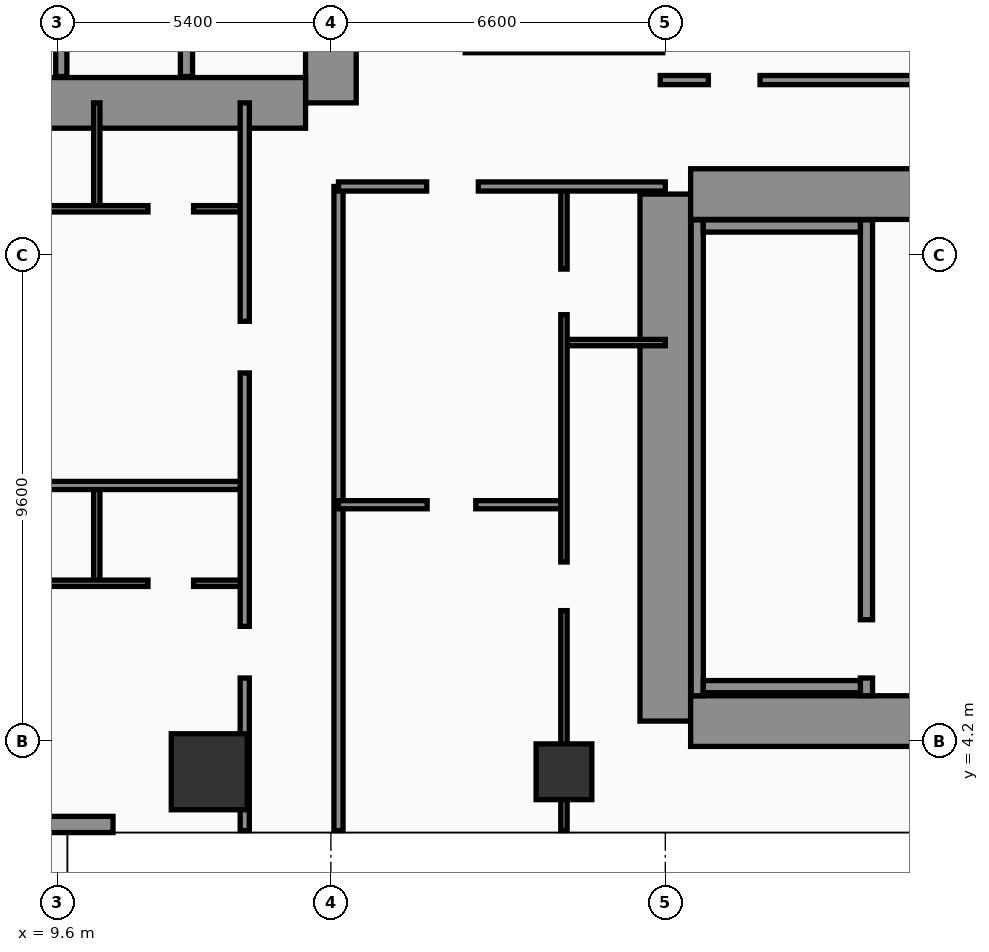
"""IFC4 building model, lengths in metres.
Left out: names, types, materials, properties, quantities, classifications, styles, units other than length and angle.
Written with IfcOpenShell. Run it as: python <this file> out.ifc"""

import sys

from ifc_helpers import new_model, si_unit, direction, frame, frame_2d, origin, origin_2d, place, context, subcontext, project, spatial, rectangle, hollow_rectangle, extrude, element, fill, save


model = new_model("IFC4")
c1 = context("Model", 3, precision=1e-05, world=origin(), true_north=direction((0.0, 1.0)))
c2 = subcontext(c1, "Body", "Model", "MODEL_VIEW")
j1 = project(units=[si_unit("LENGTHUNIT", "METRE"), si_unit("PLANEANGLEUNIT", "RADIAN")], contexts=[c1])
p1 = place(None, origin())
s1 = spatial("IfcSite", under=j1, at=p1, CompositionType="ELEMENT")
p2 = place(p1, origin())
s2 = spatial("IfcBuilding", under=s1, at=p2, CompositionType="ELEMENT")
p3 = place(p2, frame((0.0, 0.0, 66.0)))
s3 = spatial("IfcBuildingStorey", under=s2, at=p3, CompositionType="ELEMENT", Elevation=66.0)
p4 = place(p3, frame((15.0, 16.8, 0.0), z_axis=(0.0, 0.0, 1.0), x_axis=(0.0, 1.0, 0.0)))
e1 = element("IfcWall", 1, at=p4, inside=s3, PredefinedType="SHEAR", context=c2, shape_type="SweptSolid", body=[
    extrude(rectangle(XDim=21.6, YDim=1.0, at=frame_2d((10.8, 0.0))), origin(), (0.0, 0.0, 1.0), 3.56),
])
p5 = place(p4, frame((8.65, 0.0, 0.0)))
e2 = element("IfcOpeningElement", 2, at=p5, cuts=e1, PredefinedType="OPENING", context=c2, shape_type="SweptSolid", body=[
    extrude(rectangle(XDim=1.1, YDim=2.2, at=frame_2d((0.55, 1.1))), frame((0.0, 0.51, 0.0), z_axis=(0.0, -1.0, 0.0), x_axis=(1.0, 0.0, 0.0)), (0.0, 0.0, 1.0), 1.02),
])
p6 = place(p4, frame((1.25, 0.0, 0.0)))
e3 = element("IfcOpeningElement", 3, at=p6, cuts=e1, PredefinedType="OPENING", context=c2, shape_type="SweptSolid", body=[
    extrude(rectangle(XDim=1.1, YDim=2.2, at=frame_2d((0.55, 1.1))), frame((0.0, 0.51, 0.0), z_axis=(0.0, -1.0, 0.0), x_axis=(1.0, 0.0, 0.0)), (0.0, 0.0, 1.0), 1.02),
])
p7 = place(p4, frame((3.8, 0.0, 0.0)))
e4 = element("IfcOpeningElement", 4, at=p7, cuts=e1, PredefinedType="OPENING", context=c2, shape_type="SweptSolid", body=[
    extrude(rectangle(XDim=1.1, YDim=2.2, at=frame_2d((0.55, 1.1))), frame((0.0, 0.51, 0.0), z_axis=(0.0, -1.0, 0.0), x_axis=(1.0, 0.0, 0.0)), (0.0, 0.0, 1.0), 1.02),
])
p8 = place(p4, frame((6.35, 0.0, 0.0)))
e5 = element("IfcOpeningElement", 5, at=p8, cuts=e1, PredefinedType="OPENING", context=c2, shape_type="SweptSolid", body=[
    extrude(rectangle(XDim=1.1, YDim=2.2, at=frame_2d((0.55, 1.1))), frame((0.0, 0.51, 0.0), z_axis=(0.0, -1.0, 0.0), x_axis=(1.0, 0.0, 0.0)), (0.0, 0.0, 1.0), 1.02),
])
p9 = place(p3, frame((4.7, 16.8, 0.0), z_axis=(0.0, 0.0, 1.0), x_axis=(1.0, 0.0, 0.0)))
e6 = element("IfcWall", 6, at=p9, inside=s3, PredefinedType="SHEAR", context=c2, shape_type="SweptSolid", body=[
    extrude(rectangle(XDim=9.8, YDim=1.0, at=frame_2d((4.9, 0.0))), origin(), (0.0, 0.0, 1.0), 3.56),
])
p10 = place(p3, frame((21.6, 4.6, 0.0), z_axis=(0.0, 0.0, 1.0), x_axis=(0.0, 1.0, 0.0)))
e7 = element("IfcWall", 7, at=p10, inside=s3, PredefinedType="SHEAR", context=c2, shape_type="SweptSolid", body=[
    extrude(rectangle(XDim=10.4, YDim=1.0, at=frame_2d((5.2, 0.0))), origin(), (0.0, 0.0, 1.0), 3.56),
])
p11 = place(p3, frame((22.1, 15.0, 0.0), z_axis=(0.0, 0.0, 1.0), x_axis=(1.0, 0.0, 0.0)))
e8 = element("IfcWall", 8, at=p11, inside=s3, PredefinedType="SHEAR", context=c2, shape_type="SweptSolid", body=[
    extrude(rectangle(XDim=9.8, YDim=1.0, at=frame_2d((4.9, 0.0))), origin(), (0.0, 0.0, 1.0), 3.56),
])
p12 = place(p11, frame((4.8, 0.0, 0.0)))
e9 = element("IfcOpeningElement", 9, at=p12, cuts=e8, PredefinedType="OPENING", context=c2, shape_type="SweptSolid", body=[
    extrude(rectangle(XDim=1.1, YDim=2.2, at=frame_2d((0.55, 1.1))), frame((0.0, 0.51, 0.0), z_axis=(0.0, -1.0, 0.0), x_axis=(1.0, 0.0, 0.0)), (0.0, 0.0, 1.0), 1.02),
])
p13 = place(p3, frame((22.1, 4.6, 0.0), z_axis=(0.0, 0.0, 1.0), x_axis=(1.0, 0.0, 0.0)))
e10 = element("IfcWall", 10, at=p13, inside=s3, PredefinedType="SHEAR", context=c2, shape_type="SweptSolid", body=[
    extrude(rectangle(XDim=9.8, YDim=1.0, at=frame_2d((4.9, 0.0))), origin(), (0.0, 0.0, 1.0), 3.56),
])
p14 = place(p3, frame((22.23, 5.1, 0.0), z_axis=(0.0, 0.0, 1.0), x_axis=(0.0, 1.0, 0.0)))
e11 = element("IfcWall", 11, at=p14, inside=s3, PredefinedType="SOLIDWALL", context=c2, shape_type="SweptSolid", body=[
    extrude(rectangle(XDim=9.39, YDim=0.24, at=frame_2d((4.695, 0.0))), origin(), (0.0, 0.0, 1.0), 3.56),
])
p15 = place(p3, frame((25.57, 5.1, 0.0), z_axis=(0.0, 0.0, 1.0), x_axis=(0.0, 1.0, 0.0)))
e12 = element("IfcWall", 12, at=p15, inside=s3, PredefinedType="SOLIDWALL", context=c2, shape_type="SweptSolid", body=[
    extrude(rectangle(XDim=9.39, YDim=0.24, at=frame_2d((4.695, 0.0))), origin(), (0.0, 0.0, 1.0), 3.56),
])
p16 = place(p15, frame((0.35, 0.0, 0.0)))
e13 = element("IfcOpeningElement", 13, at=p16, cuts=e12, PredefinedType="OPENING", context=c2, shape_type="SweptSolid", body=[
    extrude(rectangle(XDim=1.15, YDim=2.2, at=frame_2d((0.575, 1.1))), frame((0.0, 0.13, 0.0), z_axis=(0.0, -1.0, 0.0), x_axis=(1.0, 0.0, 0.0)), (0.0, 0.0, 1.0), 0.26),
])
for number, where, z_axis, x_axis in (
    (14, (22.35, 5.28, 0.0), (0.0, 0.0, 1.0), (1.0, 0.0, 0.0)),
    (15, (22.35, 14.37, 0.0), (0.0, 0.0, 1.0), (1.0, 0.0, 0.0)),
):
    element("IfcWall", number, at=place(p3, frame(where, z_axis=z_axis, x_axis=x_axis)), inside=s3, PredefinedType="SOLIDWALL", context=c2, shape_type="SweptSolid", body=[
        extrude(rectangle(XDim=3.1, YDim=0.24, at=frame_2d((1.55, 0.0))), origin(), (0.0, 0.0, 1.0), 3.56),
    ])
p17 = place(p3, frame((12.6, 3.6, 0.0), z_axis=(0.0, 0.0, 1.0), x_axis=(1.0, 0.0, 0.0)))
e16 = element("IfcColumn", 16, at=p17, inside=s3, PredefinedType="COLUMN", context=c2, shape_type="SweptSolid", body=[
    extrude(rectangle(XDim=1.5, YDim=1.5, at=origin_2d()), origin(), (0.0, 0.0, 1.0), 3.56),
])
p18 = place(p3, frame((19.6, 3.6, 0.0), z_axis=(0.0, 0.0, 1.0), x_axis=(1.0, 0.0, 0.0)))
e17 = element("IfcColumn", 17, at=p18, inside=s3, PredefinedType="COLUMN", context=c2, shape_type="SweptSolid", body=[
    extrude(hollow_rectangle(XDim=1.1, YDim=1.1, WallThickness=0.045, at=origin_2d()), origin(), (0.0, 0.0, 1.0), 3.56),
])
p19 = place(p3, frame((3.1, 2.56, 0.0), z_axis=(0.0, 0.0, 1.0), x_axis=(1.0, 0.0, 0.0)))
e18 = element("IfcWall", 18, at=p19, inside=s3, PredefinedType="SOLIDWALL", context=c2, shape_type="SweptSolid", body=[
    extrude(rectangle(XDim=7.6, YDim=0.32, at=frame_2d((3.8, 0.0))), origin(), (0.0, 0.0, 1.0), 3.56),
])
p20 = place(p19, frame((0.45, 0.0, 0.75)))
e19 = element("IfcOpeningElement", 19, at=p20, cuts=e18, PredefinedType="OPENING", context=c2, shape_type="SweptSolid", body=[
    extrude(rectangle(XDim=1.0, YDim=1.6, at=frame_2d((0.5, 0.8))), frame((0.0, 0.17, 0.0), z_axis=(0.0, -1.0, 0.0), x_axis=(1.0, 0.0, 0.0)), (0.0, 0.0, 1.0), 0.34),
])
p21 = place(p19, frame((3.8, 0.0, 0.0)))
e20 = element("IfcOpeningElement", 20, at=p21, cuts=e18, PredefinedType="OPENING", context=c2, shape_type="SweptSolid", body=[
    extrude(rectangle(XDim=1.4, YDim=2.25, at=frame_2d((0.7, 1.125))), frame((0.0, 0.17, 0.0), z_axis=(0.0, -1.0, 0.0), x_axis=(1.0, 0.0, 0.0)), (0.0, 0.0, 1.0), 0.34),
])
p22 = place(p3, frame((9.68, 17.32, 0.0), z_axis=(0.0, 0.0, 1.0), x_axis=(0.0, 1.0, 0.0)))
e21 = element("IfcWall", 21, at=p22, inside=s3, PredefinedType="SOLIDWALL", context=c2, shape_type="SweptSolid", body=[
    extrude(rectangle(XDim=7.68, YDim=0.22, at=frame_2d((3.84, 0.0))), origin(), (0.0, 0.0, 1.0), 3.56),
])
p23 = place(p3, frame((12.15, 17.32, 0.0), z_axis=(0.0, 0.0, 1.0), x_axis=(0.0, 1.0, 0.0)))
e22 = element("IfcWall", 22, at=p23, inside=s3, PredefinedType="SOLIDWALL", context=c2, shape_type="SweptSolid", body=[
    extrude(rectangle(XDim=7.65, YDim=0.24, at=frame_2d((3.825, 0.0))), origin(), (0.0, 0.0, 1.0), 3.56),
])
p24 = place(p3, frame((10.38, 7.32, 0.0), z_axis=(0.0, 0.0, 1.0), x_axis=(0.0, 1.0, 0.0)))
e23 = element("IfcWall", 23, at=p24, inside=s3, PredefinedType="PARTITIONING", context=c2, shape_type="SweptSolid", body=[
    extrude(rectangle(XDim=1.93, YDim=0.125, at=frame_2d((0.965, 0.0))), origin(), (0.0, 0.0, 1.0), 3.56),
])
p25 = place(p3, frame((3.2, 7.32, 0.0), z_axis=(0.0, 0.0, 1.0), x_axis=(1.0, 0.0, 0.0)))
e24 = element("IfcWall", 24, at=p25, inside=s3, PredefinedType="PARTITIONING", context=c2, shape_type="SweptSolid", body=[
    extrude(rectangle(XDim=10.1, YDim=0.125, at=frame_2d((5.05, 0.0))), origin(), (0.0, 0.0, 1.0), 2.84),
])
p26 = place(p25, frame((3.29, 0.0, 0.0)))
e25 = element("IfcOpeningElement", 25, at=p26, cuts=e24, PredefinedType="OPENING", context=c2, shape_type="SweptSolid", body=[
    extrude(rectangle(XDim=0.96, YDim=2.2, at=frame_2d((0.48, 1.1))), frame((0.0, 0.073, 0.0), z_axis=(0.0, -1.0, 0.0), x_axis=(1.0, 0.0, 0.0)), (0.0, 0.0, 1.0), 0.145),
])
p27 = place(p25, frame((8.19, 0.0, 0.0)))
e26 = element("IfcOpeningElement", 26, at=p27, cuts=e24, PredefinedType="OPENING", context=c2, shape_type="SweptSolid", body=[
    extrude(rectangle(XDim=0.9, YDim=2.15, at=frame_2d((0.45, 1.075))), frame((0.0, 0.073, 0.0), z_axis=(0.0, -1.0, 0.0), x_axis=(1.0, 0.0, 0.0)), (0.0, 0.0, 1.0), 0.145),
])
p28 = place(p3, frame((10.38, 14.71, 0.0), z_axis=(0.0, 0.0, 1.0), x_axis=(0.0, 1.0, 0.0)))
e27 = element("IfcWall", 27, at=p28, inside=s3, PredefinedType="PARTITIONING", context=c2, shape_type="SweptSolid", body=[
    extrude(rectangle(XDim=2.09, YDim=0.125, at=frame_2d((1.045, 0.0))), origin(), (0.0, 0.0, 1.0), 3.56),
])
p29 = place(p3, frame((0.08, 14.71, 0.0), z_axis=(0.0, 0.0, 1.0), x_axis=(1.0, 0.0, 0.0)))
e28 = element("IfcWall", 28, at=p29, inside=s3, PredefinedType="PARTITIONING", context=c2, shape_type="SweptSolid", body=[
    extrude(rectangle(XDim=13.22, YDim=0.125, at=frame_2d((6.61, 0.0))), origin(), (0.0, 0.0, 1.0), 2.84),
])
p30 = place(p29, frame((4.67, 0.0, 0.0)))
e29 = element("IfcOpeningElement", 29, at=p30, cuts=e28, PredefinedType="OPENING", context=c2, shape_type="SweptSolid", body=[
    extrude(rectangle(XDim=0.96, YDim=2.2, at=frame_2d((0.48, 1.1))), frame((0.0, 0.073, 0.0), z_axis=(0.0, -1.0, 0.0), x_axis=(1.0, 0.0, 0.0)), (0.0, 0.0, 1.0), 0.145),
])
p31 = place(p29, frame((11.31, 0.0, 0.0)))
e30 = element("IfcOpeningElement", 30, at=p31, cuts=e28, PredefinedType="OPENING", context=c2, shape_type="SweptSolid", body=[
    extrude(rectangle(XDim=0.9, YDim=2.15, at=frame_2d((0.45, 1.075))), frame((0.0, 0.073, 0.0), z_axis=(0.0, -1.0, 0.0), x_axis=(1.0, 0.0, 0.0)), (0.0, 0.0, 1.0), 0.145),
])
p32 = place(p3, frame((0.08, 9.25, 0.0), z_axis=(0.0, 0.0, 1.0), x_axis=(1.0, 0.0, 0.0)))
e31 = element("IfcWall", 31, at=p32, inside=s3, PredefinedType="PARTITIONING", context=c2, shape_type="SweptSolid", body=[
    extrude(rectangle(XDim=13.22, YDim=0.16, at=frame_2d((6.61, 0.0))), origin(), (0.0, 0.0, 1.0), 2.84),
])
p33 = place(p3, frame((13.3, 2.44, 0.0), z_axis=(0.0, 0.0, 1.0), x_axis=(0.0, 1.0, 0.0)))
e32 = element("IfcWall", 32, at=p33, inside=s3, PredefinedType="PARTITIONING", context=c2, shape_type="SweptSolid", body=[
    extrude(rectangle(XDim=14.36, YDim=0.18, at=frame_2d((7.18, 0.0))), origin(), (0.0, 0.0, 1.0), 3.04),
])
p34 = place(p33, frame((3.01, 0.0, 0.0)))
e33 = element("IfcOpeningElement", 33, at=p34, cuts=e32, PredefinedType="OPENING", context=c2, shape_type="SweptSolid", body=[
    extrude(rectangle(XDim=1.02, YDim=2.2, at=frame_2d((0.51, 1.1))), frame((0.0, 0.1, 0.0), z_axis=(0.0, -1.0, 0.0), x_axis=(1.0, 0.0, 0.0)), (0.0, 0.0, 1.0), 0.2),
])
p35 = place(p33, frame((9.03, 0.0, 0.0)))
e34 = element("IfcOpeningElement", 34, at=p35, cuts=e32, PredefinedType="OPENING", context=c2, shape_type="SweptSolid", body=[
    extrude(rectangle(XDim=1.02, YDim=2.2, at=frame_2d((0.51, 1.1))), frame((0.0, 0.1, 0.0), z_axis=(0.0, -1.0, 0.0), x_axis=(1.0, 0.0, 0.0)), (0.0, 0.0, 1.0), 0.2),
])
p36 = place(p3, frame((15.15, 2.44, 0.0), z_axis=(0.0, 0.0, 1.0), x_axis=(0.0, 1.0, 0.0)))
e35 = element("IfcWall", 35, at=p36, inside=s3, PredefinedType="PARTITIONING", context=c2, shape_type="SweptSolid", body=[
    extrude(rectangle(XDim=12.71, YDim=0.18, at=frame_2d((6.355, 0.0))), origin(), (0.0, 0.0, 1.0), 3.04),
])
p37 = place(p3, frame((19.6, 12.07, 0.0), z_axis=(0.0, 0.0, 1.0), x_axis=(1.0, 0.0, 0.0)))
e36 = element("IfcWall", 36, at=p37, inside=s3, PredefinedType="PARTITIONING", context=c2, shape_type="SweptSolid", body=[
    extrude(rectangle(XDim=2.0, YDim=0.125, at=frame_2d((1.0, 0.0))), origin(), (0.0, 0.0, 1.0), 3.56),
])
p38 = place(p3, frame((15.15, 8.87, 0.0), z_axis=(0.0, 0.0, 1.0), x_axis=(1.0, 0.0, 0.0)))
e37 = element("IfcWall", 37, at=p38, inside=s3, PredefinedType="PARTITIONING", context=c2, shape_type="SweptSolid", body=[
    extrude(rectangle(XDim=4.45, YDim=0.16, at=frame_2d((2.225, 0.0))), origin(), (0.0, 0.0, 1.0), 3.56),
])
p39 = place(p38, frame((1.75, 0.0, 0.0)))
e38 = element("IfcOpeningElement", 38, at=p39, cuts=e37, PredefinedType="OPENING", context=c2, shape_type="SweptSolid", body=[
    extrude(rectangle(XDim=0.96, YDim=2.2, at=frame_2d((0.48, 1.1))), frame((0.0, 0.09, 0.0), z_axis=(0.0, -1.0, 0.0), x_axis=(1.0, 0.0, 0.0)), (0.0, 0.0, 1.0), 0.18),
])
p40 = place(p3, frame((19.6, 2.44, 0.0), z_axis=(0.0, 0.0, 1.0), x_axis=(0.0, 1.0, 0.0)))
e39 = element("IfcWall", 39, at=p40, inside=s3, PredefinedType="PARTITIONING", context=c2, shape_type="SweptSolid", body=[
    extrude(rectangle(XDim=12.71, YDim=0.125, at=frame_2d((6.355, 0.0))), origin(), (0.0, 0.0, 1.0), 2.34),
])
p41 = place(p40, frame((4.34, 0.0, 0.0)))
e40 = element("IfcOpeningElement", 40, at=p41, cuts=e39, PredefinedType="OPENING", context=c2, shape_type="SweptSolid", body=[
    extrude(rectangle(XDim=0.96, YDim=2.2, at=frame_2d((0.48, 1.1))), frame((0.0, 0.073, 0.0), z_axis=(0.0, -1.0, 0.0), x_axis=(1.0, 0.0, 0.0)), (0.0, 0.0, 1.0), 0.145),
])
p42 = place(p40, frame((10.18, 0.0, 0.0)))
e41 = element("IfcOpeningElement", 41, at=p42, cuts=e39, PredefinedType="OPENING", context=c2, shape_type="SweptSolid", body=[
    extrude(rectangle(XDim=0.9, YDim=2.15, at=frame_2d((0.45, 1.075))), frame((0.0, 0.073, 0.0), z_axis=(0.0, -1.0, 0.0), x_axis=(1.0, 0.0, 0.0)), (0.0, 0.0, 1.0), 0.145),
])
p43 = place(p3, frame((15.15, 15.15, 0.0), z_axis=(0.0, 0.0, 1.0), x_axis=(1.0, 0.0, 0.0)))
e42 = element("IfcWall", 42, at=p43, inside=s3, PredefinedType="PARTITIONING", context=c2, shape_type="SweptSolid", body=[
    extrude(rectangle(XDim=6.45, YDim=0.18, at=frame_2d((3.225, 0.0))), origin(), (0.0, 0.0, 1.0), 2.34),
])
p44 = place(p43, frame((1.74, 0.0, 0.0)))
e43 = element("IfcOpeningElement", 43, at=p44, cuts=e42, PredefinedType="OPENING", context=c2, shape_type="SweptSolid", body=[
    extrude(rectangle(XDim=1.02, YDim=2.2, at=frame_2d((0.51, 1.1))), frame((0.0, 0.1, 0.0), z_axis=(0.0, -1.0, 0.0), x_axis=(1.0, 0.0, 0.0)), (0.0, 0.0, 1.0), 0.2),
])
p45 = place(p3, frame((17.65, 17.88, 0.0), z_axis=(0.0, 0.0, 1.0), x_axis=(1.0, 0.0, 0.0)))
e44 = element("IfcWall", 44, at=p45, inside=s3, PredefinedType="PARTITIONING", context=c2, shape_type="SweptSolid", body=[
    extrude(rectangle(XDim=3.9, YDim=0.18, at=frame_2d((1.95, 0.0))), origin(), (0.0, 0.0, 1.0), 3.56),
])
p46 = place(p3, frame((21.5, 17.25, 0.0), z_axis=(0.0, 0.0, 1.0), x_axis=(1.0, 0.0, 0.0)))
e45 = element("IfcWall", 45, at=p46, inside=s3, PredefinedType="PARTITIONING", context=c2, shape_type="SweptSolid", body=[
    extrude(rectangle(XDim=27.45, YDim=0.18, at=frame_2d((13.725, 0.0))), origin(), (0.0, 0.0, 1.0), 2.84),
])
p47 = place(p46, frame((0.95, 0.0, 0.0)))
e46 = element("IfcOpeningElement", 46, at=p47, cuts=e45, PredefinedType="OPENING", context=c2, shape_type="SweptSolid", body=[
    extrude(rectangle(XDim=1.02, YDim=2.2, at=frame_2d((0.51, 1.1))), frame((0.0, 0.1, 0.0), z_axis=(0.0, -1.0, 0.0), x_axis=(1.0, 0.0, 0.0)), (0.0, 0.0, 1.0), 0.2),
])
p48 = place(p46, frame((15.28, 0.0, 0.0)))
e47 = element("IfcOpeningElement", 47, at=p48, cuts=e45, PredefinedType="OPENING", context=c2, shape_type="SweptSolid", body=[
    extrude(rectangle(XDim=1.02, YDim=2.2, at=frame_2d((0.51, 1.1))), frame((0.0, 0.1, 0.0), z_axis=(0.0, -1.0, 0.0), x_axis=(1.0, 0.0, 0.0)), (0.0, 0.0, 1.0), 0.2),
])
p49 = place(p27, origin())
e48 = element("IfcDoor", 48, at=p49, inside=s3, OperationType="SINGLE_SWING_RIGHT", PredefinedType="DOOR", context=c2, shape_type="SweptSolid", body=[
    extrude(rectangle(XDim=0.9, YDim=2.15, at=frame_2d((0.45, 1.075))), frame((0.0, 0.025, 0.0), z_axis=(0.0, -1.0, 0.0), x_axis=(1.0, 0.0, 0.0)), (0.0, 0.0, 1.0), 0.05),
])
fill(e26, e48)
p50 = place(p31, origin())
e49 = element("IfcDoor", 49, at=p50, inside=s3, OperationType="SINGLE_SWING_RIGHT", PredefinedType="DOOR", context=c2, shape_type="SweptSolid", body=[
    extrude(rectangle(XDim=0.9, YDim=2.15, at=frame_2d((0.45, 1.075))), frame((0.0, 0.025, 0.0), z_axis=(0.0, -1.0, 0.0), x_axis=(1.0, 0.0, 0.0)), (0.0, 0.0, 1.0), 0.05),
])
fill(e30, e49)
p51 = place(p34, origin())
e50 = element("IfcDoor", 50, at=p51, inside=s3, OperationType="SINGLE_SWING_LEFT", PredefinedType="DOOR", context=c2, shape_type="SweptSolid", body=[
    extrude(rectangle(XDim=1.02, YDim=2.2, at=frame_2d((0.51, 1.1))), frame((0.0, 0.025, 0.0), z_axis=(0.0, -1.0, 0.0), x_axis=(1.0, 0.0, 0.0)), (0.0, 0.0, 1.0), 0.05),
])
fill(e33, e50)
p52 = place(p35, origin())
e51 = element("IfcDoor", 51, at=p52, inside=s3, OperationType="SINGLE_SWING_RIGHT", PredefinedType="DOOR", context=c2, shape_type="SweptSolid", body=[
    extrude(rectangle(XDim=1.02, YDim=2.2, at=frame_2d((0.51, 1.1))), frame((0.0, 0.025, 0.0), z_axis=(0.0, -1.0, 0.0), x_axis=(1.0, 0.0, 0.0)), (0.0, 0.0, 1.0), 0.05),
])
fill(e34, e51)
p53 = place(p39, origin())
e52 = element("IfcDoor", 52, at=p53, inside=s3, OperationType="SINGLE_SWING_LEFT", PredefinedType="DOOR", context=c2, shape_type="SweptSolid", body=[
    extrude(rectangle(XDim=0.96, YDim=2.2, at=frame_2d((0.48, 1.1))), frame((0.0, 0.025, 0.0), z_axis=(0.0, -1.0, 0.0), x_axis=(1.0, 0.0, 0.0)), (0.0, 0.0, 1.0), 0.05),
])
fill(e38, e52)
p54 = place(p41, origin())
e53 = element("IfcDoor", 53, at=p54, inside=s3, OperationType="SINGLE_SWING_LEFT", PredefinedType="DOOR", context=c2, shape_type="SweptSolid", body=[
    extrude(rectangle(XDim=0.96, YDim=2.2, at=frame_2d((0.48, 1.1))), frame((0.0, 0.025, 0.0), z_axis=(0.0, -1.0, 0.0), x_axis=(1.0, 0.0, 0.0)), (0.0, 0.0, 1.0), 0.05),
])
fill(e40, e53)
p55 = place(p42, origin())
e54 = element("IfcDoor", 54, at=p55, inside=s3, OperationType="SINGLE_SWING_RIGHT", PredefinedType="DOOR", context=c2, shape_type="SweptSolid", body=[
    extrude(rectangle(XDim=0.9, YDim=2.15, at=frame_2d((0.45, 1.075))), frame((0.0, 0.025, 0.0), z_axis=(0.0, -1.0, 0.0), x_axis=(1.0, 0.0, 0.0)), (0.0, 0.0, 1.0), 0.05),
])
fill(e41, e54)
p56 = place(p44, origin())
e55 = element("IfcDoor", 55, at=p56, inside=s3, OperationType="SINGLE_SWING_LEFT", PredefinedType="DOOR", context=c2, shape_type="SweptSolid", body=[
    extrude(rectangle(XDim=1.02, YDim=2.2, at=frame_2d((0.51, 1.1))), frame((0.0, 0.025, 0.0), z_axis=(0.0, -1.0, 0.0), x_axis=(1.0, 0.0, 0.0)), (0.0, 0.0, 1.0), 0.05),
])
fill(e43, e55)
p57 = place(p47, origin())
e56 = element("IfcDoor", 56, at=p57, inside=s3, OperationType="SINGLE_SWING_RIGHT", PredefinedType="DOOR", context=c2, shape_type="SweptSolid", body=[
    extrude(rectangle(XDim=1.02, YDim=2.2, at=frame_2d((0.51, 1.1))), frame((0.0, 0.025, 0.0), z_axis=(0.0, -1.0, 0.0), x_axis=(1.0, 0.0, 0.0)), (0.0, 0.0, 1.0), 0.05),
])
fill(e46, e56)
p58 = place(p16, origin())
e57 = element("IfcDoor", 57, at=p58, inside=s3, OperationType="SINGLE_SWING_RIGHT", PredefinedType="DOOR", context=c2, shape_type="SweptSolid", body=[
    extrude(rectangle(XDim=1.15, YDim=2.2, at=frame_2d((0.575, 1.1))), frame((0.0, 0.025, 0.0), z_axis=(0.0, -1.0, 0.0), x_axis=(1.0, 0.0, 0.0)), (0.0, 0.0, 1.0), 0.05),
])
fill(e13, e57)
save(model, sys.argv[1])
